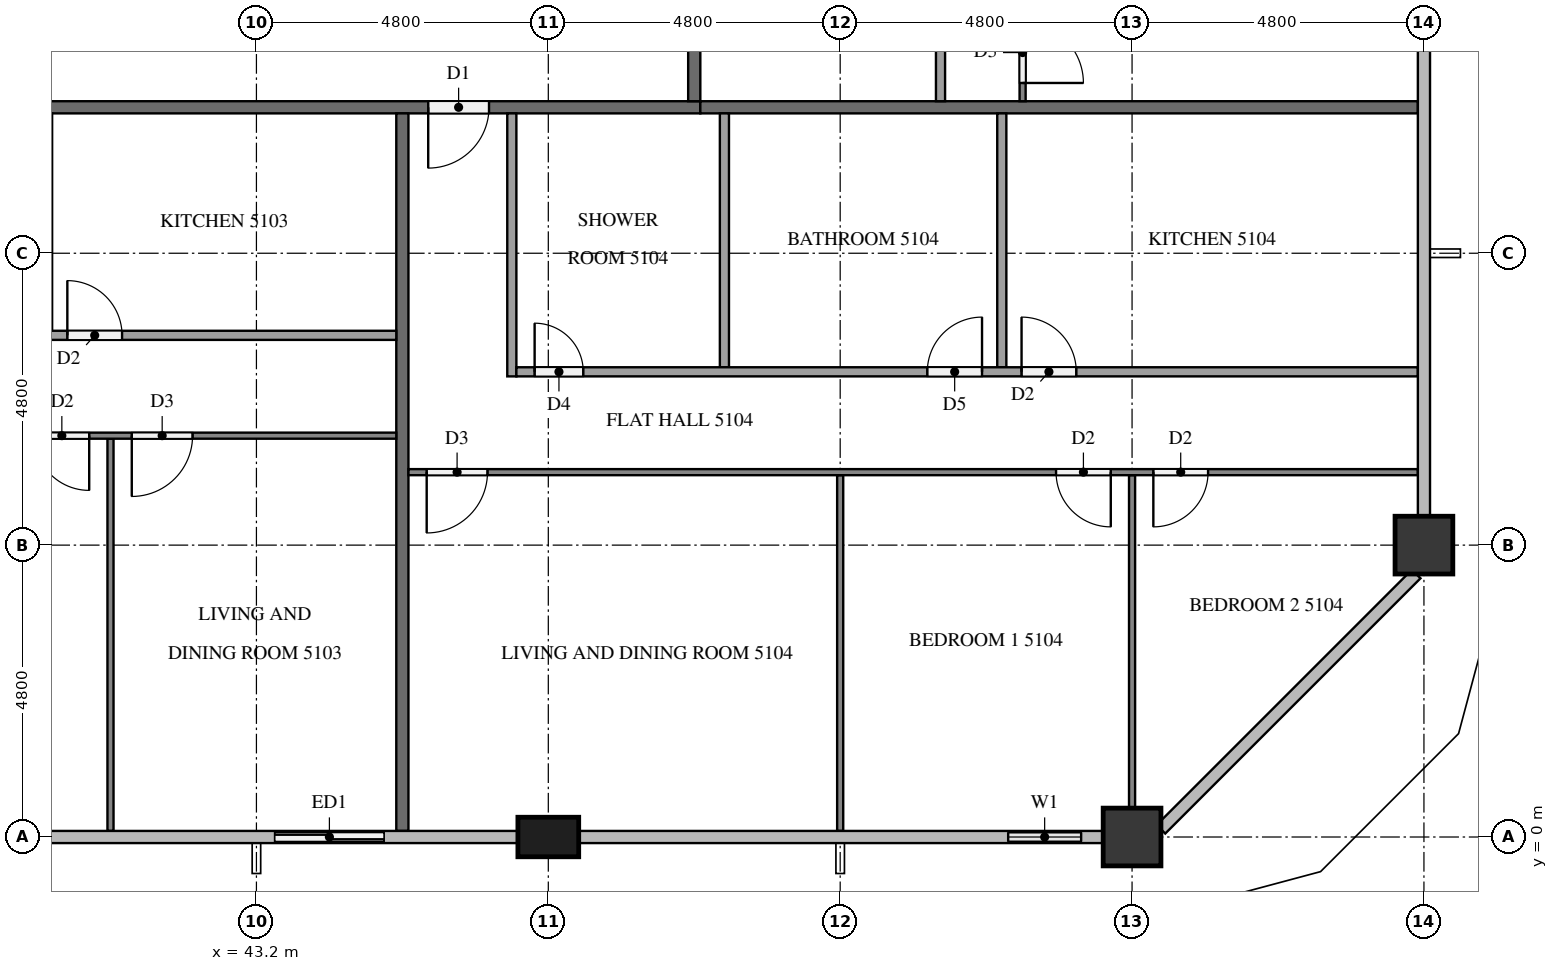
"""IFC4 building model, lengths in metres.
Left out: names, types, materials, properties, quantities, classifications, styles, units other than length and angle.
Written with IfcOpenShell. Run it as: python <this file> out.ifc"""

import sys

from ifc_helpers import new_model, si_unit, direction, frame, frame_2d, origin, origin_2d, place, context, subcontext, project, spatial, rectangle, extrude, element, fill, save


model = new_model("IFC4")
c1 = context("Model", 3, precision=1e-05, world=origin(), true_north=direction((0.0, 1.0)))
c2 = subcontext(c1, "Body", "Model", "MODEL_VIEW")
j1 = project(units=[si_unit("LENGTHUNIT", "METRE"), si_unit("PLANEANGLEUNIT", "RADIAN")], contexts=[c1])
p1 = place(None, origin())
s1 = spatial("IfcSite", under=j1, at=p1, CompositionType="ELEMENT")
p2 = place(p1, origin())
s2 = spatial("IfcBuilding", under=s1, at=p2, CompositionType="ELEMENT")
p3 = place(p2, frame((0.0, 0.0, 196.4)))
s3 = spatial("IfcBuildingStorey", under=s2, at=p3, CompositionType="ELEMENT", Elevation=196.4)
p4 = place(p3, frame((48.0, 0.0, 0.0), z_axis=(0.0, 0.0, 1.0), x_axis=(1.0, 0.0, 0.0)))
e1 = element("IfcColumn", 1, at=p4, inside=s3, PredefinedType="COLUMN", context=c2, shape_type="SweptSolid", body=[
    extrude(rectangle(XDim=1.0, YDim=0.65, at=origin_2d()), origin(), (0.0, 0.0, 1.0), 3.2),
])
for number, where, z_axis, x_axis in (
    (2, (57.6, 0.0, 0.0), (0.0, 0.0, 1.0), (1.0, 0.0, 0.0)),
    (3, (62.4, 4.8, 0.0), (0.0, 0.0, 1.0), (1.0, 0.0, 0.0)),
):
    element("IfcColumn", number, at=place(p3, frame(where, z_axis=z_axis, x_axis=x_axis)), inside=s3, PredefinedType="COLUMN", context=c2, shape_type="SweptSolid", body=[
        extrude(rectangle(XDim=0.95, YDim=0.95, at=origin_2d()), origin(), (0.0, 0.0, 1.0), 3.2),
    ])
p5 = place(p3, frame((43.2, 0.0, 0.0), z_axis=(0.0, 0.0, 1.0), x_axis=(1.0, 0.0, 0.0)))
e4 = element("IfcWall", 4, at=p5, inside=s3, PredefinedType="SOLIDWALL", context=c2, shape_type="SweptSolid", body=[
    extrude(rectangle(XDim=2.4, YDim=0.15, at=frame_2d((1.2, 0.0))), origin(), (0.0, 0.0, 1.0), 3.2),
])
p6 = place(p5, frame((0.3, 0.0, 0.0)))
e5 = element("IfcOpeningElement", 5, at=p6, cuts=e4, PredefinedType="OPENING", context=c2, shape_type="SweptSolid", body=[
    extrude(rectangle(XDim=1.8, YDim=2.4, at=frame_2d((0.9, 1.2))), frame((0.0, 0.085, 0.0), z_axis=(0.0, -1.0, 0.0), x_axis=(1.0, 0.0, 0.0)), (0.0, 0.0, 1.0), 0.17),
])
p7 = place(p3, frame((55.2, 0.0, 0.0), z_axis=(0.0, 0.0, 1.0), x_axis=(1.0, 0.0, 0.0)))
e6 = element("IfcWall", 6, at=p7, inside=s3, PredefinedType="SOLIDWALL", context=c2, shape_type="SweptSolid", body=[
    extrude(rectangle(XDim=1.925, YDim=0.15, at=frame_2d((0.962, 0.0))), origin(), (0.0, 0.0, 1.0), 3.2),
])
p8 = place(p7, frame((0.363, 0.0, 0.9)))
e7 = element("IfcOpeningElement", 7, at=p8, cuts=e6, PredefinedType="OPENING", context=c2, shape_type="SweptSolid", body=[
    extrude(rectangle(XDim=1.2, YDim=1.4, at=frame_2d((0.6, 0.7))), frame((0.0, 0.085, 0.0), z_axis=(0.0, -1.0, 0.0), x_axis=(1.0, 0.0, 0.0)), (0.0, 0.0, 1.0), 0.17),
])
p9 = place(p3, frame((50.5, 12.0, 0.0), z_axis=(0.0, 0.0, 1.0), x_axis=(-1.0, 0.0, 0.0)))
e8 = element("IfcWall", 8, at=p9, inside=s3, PredefinedType="PARTITIONING", context=c2, shape_type="SweptSolid", body=[
    extrude(rectangle(XDim=38.6, YDim=0.2, at=frame_2d((19.3, 0.0))), origin(), (0.0, 0.0, 1.0), 3.2),
])
p10 = place(p9, frame((31.725, 0.0, 0.0)))
e9 = element("IfcOpeningElement", 9, at=p10, cuts=e8, PredefinedType="OPENING", context=c2, shape_type="SweptSolid", body=[
    extrude(rectangle(XDim=1.0, YDim=2.1, at=frame_2d((0.5, 1.05))), frame((0.0, 0.11, 0.0), z_axis=(0.0, -1.0, 0.0), x_axis=(1.0, 0.0, 0.0)), (0.0, 0.0, 1.0), 0.22),
])
p11 = place(p9, frame((19.725, 0.0, 0.0)))
e10 = element("IfcOpeningElement", 10, at=p11, cuts=e8, PredefinedType="OPENING", context=c2, shape_type="SweptSolid", body=[
    extrude(rectangle(XDim=1.0, YDim=2.1, at=frame_2d((0.5, 1.05))), frame((0.0, 0.11, 0.0), z_axis=(0.0, -1.0, 0.0), x_axis=(1.0, 0.0, 0.0)), (0.0, 0.0, 1.0), 0.22),
])
p12 = place(p9, frame((17.875, 0.0, 0.0)))
e11 = element("IfcOpeningElement", 11, at=p12, cuts=e8, PredefinedType="OPENING", context=c2, shape_type="SweptSolid", body=[
    extrude(rectangle(XDim=1.0, YDim=2.1, at=frame_2d((0.5, 1.05))), frame((0.0, 0.11, 0.0), z_axis=(0.0, -1.0, 0.0), x_axis=(1.0, 0.0, 0.0)), (0.0, 0.0, 1.0), 0.22),
])
p13 = place(p9, frame((3.475, 0.0, 0.0)))
e12 = element("IfcOpeningElement", 12, at=p13, cuts=e8, PredefinedType="OPENING", context=c2, shape_type="SweptSolid", body=[
    extrude(rectangle(XDim=1.0, YDim=2.1, at=frame_2d((0.5, 1.05))), frame((0.0, 0.11, 0.0), z_axis=(0.0, -1.0, 0.0), x_axis=(1.0, 0.0, 0.0)), (0.0, 0.0, 1.0), 0.22),
])
p14 = place(p3, frame((50.4, 40.7, 0.0), z_axis=(0.0, 0.0, 1.0), x_axis=(0.0, -1.0, 0.0)))
e13 = element("IfcWall", 13, at=p14, inside=s3, PredefinedType="PARTITIONING", context=c2, shape_type="SweptSolid", body=[
    extrude(rectangle(XDim=28.6, YDim=0.2, at=frame_2d((14.3, 0.0))), origin(), (0.0, 0.0, 1.0), 3.2),
])
p15 = place(p14, frame((21.925, 0.0, 0.0)))
e14 = element("IfcOpeningElement", 14, at=p15, cuts=e13, PredefinedType="OPENING", context=c2, shape_type="SweptSolid", body=[
    extrude(rectangle(XDim=1.0, YDim=2.1, at=frame_2d((0.5, 1.05))), frame((0.0, 0.11, 0.0), z_axis=(0.0, -1.0, 0.0), x_axis=(1.0, 0.0, 0.0)), (0.0, 0.0, 1.0), 0.22),
])
p16 = place(p14, frame((20.075, 0.0, 0.0)))
e15 = element("IfcOpeningElement", 15, at=p16, cuts=e13, PredefinedType="OPENING", context=c2, shape_type="SweptSolid", body=[
    extrude(rectangle(XDim=1.0, YDim=2.1, at=frame_2d((0.5, 1.05))), frame((0.0, 0.11, 0.0), z_axis=(0.0, -1.0, 0.0), x_axis=(1.0, 0.0, 0.0)), (0.0, 0.0, 1.0), 0.22),
])
p17 = place(p14, frame((0.325, 0.0, 0.0)))
e16 = element("IfcOpeningElement", 16, at=p17, cuts=e13, PredefinedType="OPENING", context=c2, shape_type="SweptSolid", body=[
    extrude(rectangle(XDim=1.0, YDim=2.1, at=frame_2d((0.5, 1.05))), frame((0.0, 0.11, 0.0), z_axis=(0.0, -1.0, 0.0), x_axis=(1.0, 0.0, 0.0)), (0.0, 0.0, 1.0), 0.22),
])
p18 = place(p3, frame((45.6, 11.9, 0.0), z_axis=(0.0, 0.0, 1.0), x_axis=(0.0, -1.0, 0.0)))
e17 = element("IfcWall", 17, at=p18, inside=s3, PredefinedType="PARTITIONING", context=c2, shape_type="SweptSolid", body=[
    extrude(rectangle(XDim=11.8, YDim=0.2, at=frame_2d((5.9, 0.0))), origin(), (0.0, 0.0, 1.0), 3.2),
])
p19 = place(p3, frame((50.5, 12.0, 0.0), z_axis=(0.0, 0.0, 1.0), x_axis=(1.0, 0.0, 0.0)))
e18 = element("IfcWall", 18, at=p19, inside=s3, PredefinedType="PARTITIONING", context=c2, shape_type="SweptSolid", body=[
    extrude(rectangle(XDim=11.8, YDim=0.2, at=frame_2d((5.9, 0.0))), origin(), (0.0, 0.0, 1.0), 3.2),
])
p20 = place(p3, frame((40.8, 6.55, 0.0), z_axis=(0.0, 0.0, 1.0), x_axis=(0.0, -1.0, 0.0)))
e19 = element("IfcWall", 19, at=p20, inside=s3, PredefinedType="PARTITIONING", context=c2, shape_type="SweptSolid", body=[
    extrude(rectangle(XDim=6.45, YDim=0.1, at=frame_2d((3.225, 0.0))), origin(), (0.0, 0.0, 1.0), 3.2),
])
p21 = place(p3, frame((45.5, 6.6, 0.0), z_axis=(0.0, 0.0, 1.0), x_axis=(-1.0, 0.0, 0.0)))
e20 = element("IfcWall", 20, at=p21, inside=s3, PredefinedType="PARTITIONING", context=c2, shape_type="SweptSolid", body=[
    extrude(rectangle(XDim=14.2, YDim=0.1, at=frame_2d((7.1, 0.0))), origin(), (0.0, 0.0, 1.0), 3.2),
])
p22 = place(p21, frame((13.0, 0.0, 0.0)))
e21 = element("IfcOpeningElement", 21, at=p22, cuts=e20, PredefinedType="OPENING", context=c2, shape_type="SweptSolid", body=[
    extrude(rectangle(XDim=0.9, YDim=2.1, at=frame_2d((0.45, 1.05))), frame((0.0, 0.06, 0.0), z_axis=(0.0, -1.0, 0.0), x_axis=(1.0, 0.0, 0.0)), (0.0, 0.0, 1.0), 0.12),
])
p23 = place(p21, frame((5.05, 0.0, 0.0)))
e22 = element("IfcOpeningElement", 22, at=p23, cuts=e20, PredefinedType="OPENING", context=c2, shape_type="SweptSolid", body=[
    extrude(rectangle(XDim=0.9, YDim=2.1, at=frame_2d((0.45, 1.05))), frame((0.0, 0.06, 0.0), z_axis=(0.0, -1.0, 0.0), x_axis=(1.0, 0.0, 0.0)), (0.0, 0.0, 1.0), 0.12),
])
p24 = place(p21, frame((3.35, 0.0, 0.0)))
e23 = element("IfcOpeningElement", 23, at=p24, cuts=e20, PredefinedType="OPENING", context=c2, shape_type="SweptSolid", body=[
    extrude(rectangle(XDim=1.0, YDim=2.1, at=frame_2d((0.5, 1.05))), frame((0.0, 0.06, 0.0), z_axis=(0.0, -1.0, 0.0), x_axis=(1.0, 0.0, 0.0)), (0.0, 0.0, 1.0), 0.12),
])
p25 = place(p3, frame((33.075, 8.25, 0.0), z_axis=(0.0, 0.0, 1.0), x_axis=(1.0, 0.0, 0.0)))
e24 = element("IfcWall", 24, at=p25, inside=s3, PredefinedType="PARTITIONING", context=c2, shape_type="SweptSolid", body=[
    extrude(rectangle(XDim=12.425, YDim=0.15, at=frame_2d((6.212, 0.0))), origin(), (0.0, 0.0, 1.0), 3.2),
])
p26 = place(p25, frame((0.3, 0.0, 0.0)))
e25 = element("IfcOpeningElement", 25, at=p26, cuts=e24, PredefinedType="OPENING", context=c2, shape_type="SweptSolid", body=[
    extrude(rectangle(XDim=0.9, YDim=2.1, at=frame_2d((0.45, 1.05))), frame((0.0, 0.085, 0.0), z_axis=(0.0, -1.0, 0.0), x_axis=(1.0, 0.0, 0.0)), (0.0, 0.0, 1.0), 0.17),
])
p27 = place(p25, frame((5.565, 0.0, 0.0)))
e26 = element("IfcOpeningElement", 26, at=p27, cuts=e24, PredefinedType="OPENING", context=c2, shape_type="SweptSolid", body=[
    extrude(rectangle(XDim=0.8, YDim=2.1, at=frame_2d((0.4, 1.05))), frame((0.0, 0.085, 0.0), z_axis=(0.0, -1.0, 0.0), x_axis=(1.0, 0.0, 0.0)), (0.0, 0.0, 1.0), 0.17),
])
p28 = place(p25, frame((7.015, 0.0, 0.0)))
e27 = element("IfcOpeningElement", 27, at=p28, cuts=e24, PredefinedType="OPENING", context=c2, shape_type="SweptSolid", body=[
    extrude(rectangle(XDim=0.9, YDim=2.1, at=frame_2d((0.45, 1.05))), frame((0.0, 0.085, 0.0), z_axis=(0.0, -1.0, 0.0), x_axis=(1.0, 0.0, 0.0)), (0.0, 0.0, 1.0), 0.17),
])
p29 = place(p3, frame((52.8, 5.95, 0.0), z_axis=(0.0, 0.0, 1.0), x_axis=(0.0, -1.0, 0.0)))
e28 = element("IfcWall", 28, at=p29, inside=s3, PredefinedType="PARTITIONING", context=c2, shape_type="SweptSolid", body=[
    extrude(rectangle(XDim=5.85, YDim=0.1, at=frame_2d((2.925, 0.0))), origin(), (0.0, 0.0, 1.0), 3.2),
])
p30 = place(p3, frame((57.6, 5.95, 0.0), z_axis=(0.0, 0.0, 1.0), x_axis=(0.0, -1.0, 0.0)))
e29 = element("IfcWall", 29, at=p30, inside=s3, PredefinedType="PARTITIONING", context=c2, shape_type="SweptSolid", body=[
    extrude(rectangle(XDim=5.475, YDim=0.1, at=frame_2d((2.737, 0.0))), origin(), (0.0, 0.0, 1.0), 3.2),
])
p31 = place(p3, frame((62.3, 6.0, 0.0), z_axis=(0.0, 0.0, 1.0), x_axis=(-1.0, 0.0, 0.0)))
e30 = element("IfcWall", 30, at=p31, inside=s3, PredefinedType="PARTITIONING", context=c2, shape_type="SweptSolid", body=[
    extrude(rectangle(XDim=16.6, YDim=0.1, at=frame_2d((8.3, 0.0))), origin(), (0.0, 0.0, 1.0), 3.2),
])
p32 = place(p31, frame((15.3, 0.0, 0.0)))
e31 = element("IfcOpeningElement", 31, at=p32, cuts=e30, PredefinedType="OPENING", context=c2, shape_type="SweptSolid", body=[
    extrude(rectangle(XDim=1.0, YDim=2.1, at=frame_2d((0.5, 1.05))), frame((0.0, 0.06, 0.0), z_axis=(0.0, -1.0, 0.0), x_axis=(1.0, 0.0, 0.0)), (0.0, 0.0, 1.0), 0.12),
])
p33 = place(p31, frame((5.05, 0.0, 0.0)))
e32 = element("IfcOpeningElement", 32, at=p33, cuts=e30, PredefinedType="OPENING", context=c2, shape_type="SweptSolid", body=[
    extrude(rectangle(XDim=0.9, YDim=2.1, at=frame_2d((0.45, 1.05))), frame((0.0, 0.06, 0.0), z_axis=(0.0, -1.0, 0.0), x_axis=(1.0, 0.0, 0.0)), (0.0, 0.0, 1.0), 0.12),
])
p34 = place(p31, frame((3.45, 0.0, 0.0)))
e33 = element("IfcOpeningElement", 33, at=p34, cuts=e30, PredefinedType="OPENING", context=c2, shape_type="SweptSolid", body=[
    extrude(rectangle(XDim=0.9, YDim=2.1, at=frame_2d((0.45, 1.05))), frame((0.0, 0.06, 0.0), z_axis=(0.0, -1.0, 0.0), x_axis=(1.0, 0.0, 0.0)), (0.0, 0.0, 1.0), 0.12),
])
for number, where, z_axis, x_axis in (
    (34, (50.896, 11.9, 0.0), (0.0, 0.0, 1.0), (0.0, -1.0, 0.0)),
    (35, (55.458, 11.9, 0.0), (0.0, 0.0, 1.0), (0.0, -1.0, 0.0)),
):
    element("IfcWall", number, at=place(p3, frame(where, z_axis=z_axis, x_axis=x_axis)), inside=s3, PredefinedType="PARTITIONING", context=c2, shape_type="SweptSolid", body=[
        extrude(rectangle(XDim=4.175, YDim=0.15, at=frame_2d((2.087, 0.0))), origin(), (0.0, 0.0, 1.0), 3.2),
    ])
p35 = place(p3, frame((47.4, 11.9, 0.0), z_axis=(0.0, 0.0, 1.0), x_axis=(0.0, -1.0, 0.0)))
e36 = element("IfcWall", 36, at=p35, inside=s3, PredefinedType="PARTITIONING", context=c2, shape_type="SweptSolid", body=[
    extrude(rectangle(XDim=4.325, YDim=0.15, at=frame_2d((2.163, 0.0))), origin(), (0.0, 0.0, 1.0), 3.2),
])
p36 = place(p3, frame((47.475, 7.65, 0.0), z_axis=(0.0, 0.0, 1.0), x_axis=(1.0, 0.0, 0.0)))
e37 = element("IfcWall", 37, at=p36, inside=s3, PredefinedType="PARTITIONING", context=c2, shape_type="SweptSolid", body=[
    extrude(rectangle(XDim=14.825, YDim=0.15, at=frame_2d((7.413, 0.0))), origin(), (0.0, 0.0, 1.0), 3.2),
])
p37 = place(p36, frame((0.3, 0.0, 0.0)))
e38 = element("IfcOpeningElement", 38, at=p37, cuts=e37, PredefinedType="OPENING", context=c2, shape_type="SweptSolid", body=[
    extrude(rectangle(XDim=0.8, YDim=2.1, at=frame_2d((0.4, 1.05))), frame((0.0, 0.085, 0.0), z_axis=(0.0, -1.0, 0.0), x_axis=(1.0, 0.0, 0.0)), (0.0, 0.0, 1.0), 0.17),
])
p38 = place(p36, frame((6.758, 0.0, 0.0)))
e39 = element("IfcOpeningElement", 39, at=p38, cuts=e37, PredefinedType="OPENING", context=c2, shape_type="SweptSolid", body=[
    extrude(rectangle(XDim=0.9, YDim=2.1, at=frame_2d((0.45, 1.05))), frame((0.0, 0.085, 0.0), z_axis=(0.0, -1.0, 0.0), x_axis=(1.0, 0.0, 0.0)), (0.0, 0.0, 1.0), 0.17),
])
p39 = place(p36, frame((8.308, 0.0, 0.0)))
e40 = element("IfcOpeningElement", 40, at=p39, cuts=e37, PredefinedType="OPENING", context=c2, shape_type="SweptSolid", body=[
    extrude(rectangle(XDim=0.9, YDim=2.1, at=frame_2d((0.45, 1.05))), frame((0.0, 0.085, 0.0), z_axis=(0.0, -1.0, 0.0), x_axis=(1.0, 0.0, 0.0)), (0.0, 0.0, 1.0), 0.17),
])
p40 = place(p3, frame((55.8, 19.1, 0.0), z_axis=(0.0, 0.0, 1.0), x_axis=(0.0, -1.0, 0.0)))
e41 = element("IfcWall", 41, at=p40, inside=s3, PredefinedType="PARTITIONING", context=c2, shape_type="SweptSolid", body=[
    extrude(rectangle(XDim=7.0, YDim=0.1, at=frame_2d((3.5, 0.0))), origin(), (0.0, 0.0, 1.0), 3.2),
])
p41 = place(p40, frame((5.7, 0.0, 0.0)))
e42 = element("IfcOpeningElement", 42, at=p41, cuts=e41, PredefinedType="OPENING", context=c2, shape_type="SweptSolid", body=[
    extrude(rectangle(XDim=1.0, YDim=2.1, at=frame_2d((0.5, 1.05))), frame((0.0, 0.06, 0.0), z_axis=(0.0, -1.0, 0.0), x_axis=(1.0, 0.0, 0.0)), (0.0, 0.0, 1.0), 0.12),
])
p42 = place(p3, frame((54.45, 12.1, 0.0), z_axis=(0.0, 0.0, 1.0), x_axis=(0.0, 1.0, 0.0)))
e43 = element("IfcWall", 43, at=p42, inside=s3, PredefinedType="PARTITIONING", context=c2, shape_type="SweptSolid", body=[
    extrude(rectangle(XDim=5.225, YDim=0.15, at=frame_2d((2.612, 0.0))), origin(), (0.0, 0.0, 1.0), 3.2),
])
p43 = place(p42, frame((3.46, 0.0, 0.0)))
e44 = element("IfcOpeningElement", 44, at=p43, cuts=e43, PredefinedType="OPENING", context=c2, shape_type="SweptSolid", body=[
    extrude(rectangle(XDim=0.8, YDim=2.1, at=frame_2d((0.4, 1.05))), frame((0.0, 0.085, 0.0), z_axis=(0.0, -1.0, 0.0), x_axis=(1.0, 0.0, 0.0)), (0.0, 0.0, 1.0), 0.17),
])
p44 = place(p42, frame((1.91, 0.0, 0.0)))
e45 = element("IfcOpeningElement", 45, at=p44, cuts=e43, PredefinedType="OPENING", context=c2, shape_type="SweptSolid", body=[
    extrude(rectangle(XDim=0.9, YDim=2.1, at=frame_2d((0.45, 1.05))), frame((0.0, 0.085, 0.0), z_axis=(0.0, -1.0, 0.0), x_axis=(1.0, 0.0, 0.0)), (0.0, 0.0, 1.0), 0.17),
])
p45 = place(p6, origin())
e46 = element("IfcDoor", 46, at=p45, inside=s3, OperationType="SLIDING_TO_LEFT", PredefinedType="DOOR", context=c2, shape_type="SweptSolid", body=[
    extrude(rectangle(XDim=1.8, YDim=2.4, at=frame_2d((0.9, 1.2))), frame((0.0, 0.025, 0.0), z_axis=(0.0, -1.0, 0.0), x_axis=(1.0, 0.0, 0.0)), (0.0, 0.0, 1.0), 0.05),
])
fill(e5, e46)
p46 = place(p8, origin())
e47 = element("IfcWindow", 47, at=p46, inside=s3, PartitioningType="SINGLE_PANEL", PredefinedType="WINDOW", context=c2, shape_type="SweptSolid", body=[
    extrude(rectangle(XDim=1.2, YDim=1.4, at=frame_2d((0.6, 0.7))), frame((0.0, 0.03, 0.0), z_axis=(0.0, -1.0, 0.0), x_axis=(1.0, 0.0, 0.0)), (0.0, 0.0, 1.0), 0.06),
])
fill(e7, e47)
p47 = place(p13, origin())
e48 = element("IfcDoor", 48, at=p47, inside=s3, OperationType="SINGLE_SWING_RIGHT", PredefinedType="DOOR", context=c2, shape_type="SweptSolid", body=[
    extrude(rectangle(XDim=1.0, YDim=2.1, at=frame_2d((0.5, 1.05))), frame((0.0, 0.025, 0.0), z_axis=(0.0, -1.0, 0.0), x_axis=(1.0, 0.0, 0.0)), (0.0, 0.0, 1.0), 0.05),
])
fill(e12, e48)
p48 = place(p23, origin())
e49 = element("IfcDoor", 49, at=p48, inside=s3, OperationType="SINGLE_SWING_LEFT", PredefinedType="DOOR", context=c2, shape_type="SweptSolid", body=[
    extrude(rectangle(XDim=0.9, YDim=2.1, at=frame_2d((0.45, 1.05))), frame((0.0, 0.025, 0.0), z_axis=(0.0, -1.0, 0.0), x_axis=(1.0, 0.0, 0.0)), (0.0, 0.0, 1.0), 0.05),
])
fill(e22, e49)
p49 = place(p24, origin())
e50 = element("IfcDoor", 50, at=p49, inside=s3, OperationType="SINGLE_SWING_RIGHT", PredefinedType="DOOR", context=c2, shape_type="SweptSolid", body=[
    extrude(rectangle(XDim=1.0, YDim=2.1, at=frame_2d((0.5, 1.05))), frame((0.0, 0.025, 0.0), z_axis=(0.0, -1.0, 0.0), x_axis=(1.0, 0.0, 0.0)), (0.0, 0.0, 1.0), 0.05),
])
fill(e23, e50)
p50 = place(p28, origin())
e51 = element("IfcDoor", 51, at=p50, inside=s3, OperationType="SINGLE_SWING_LEFT", PredefinedType="DOOR", context=c2, shape_type="SweptSolid", body=[
    extrude(rectangle(XDim=0.9, YDim=2.1, at=frame_2d((0.45, 1.05))), frame((0.0, 0.025, 0.0), z_axis=(0.0, -1.0, 0.0), x_axis=(1.0, 0.0, 0.0)), (0.0, 0.0, 1.0), 0.05),
])
fill(e27, e51)
p51 = place(p32, origin())
e52 = element("IfcDoor", 52, at=p51, inside=s3, OperationType="SINGLE_SWING_RIGHT", PredefinedType="DOOR", context=c2, shape_type="SweptSolid", body=[
    extrude(rectangle(XDim=1.0, YDim=2.1, at=frame_2d((0.5, 1.05))), frame((0.0, 0.025, 0.0), z_axis=(0.0, -1.0, 0.0), x_axis=(1.0, 0.0, 0.0)), (0.0, 0.0, 1.0), 0.05),
])
fill(e31, e52)
p52 = place(p33, origin())
e53 = element("IfcDoor", 53, at=p52, inside=s3, OperationType="SINGLE_SWING_LEFT", PredefinedType="DOOR", context=c2, shape_type="SweptSolid", body=[
    extrude(rectangle(XDim=0.9, YDim=2.1, at=frame_2d((0.45, 1.05))), frame((0.0, 0.025, 0.0), z_axis=(0.0, -1.0, 0.0), x_axis=(1.0, 0.0, 0.0)), (0.0, 0.0, 1.0), 0.05),
])
fill(e32, e53)
p53 = place(p34, origin())
e54 = element("IfcDoor", 54, at=p53, inside=s3, OperationType="SINGLE_SWING_RIGHT", PredefinedType="DOOR", context=c2, shape_type="SweptSolid", body=[
    extrude(rectangle(XDim=0.9, YDim=2.1, at=frame_2d((0.45, 1.05))), frame((0.0, 0.025, 0.0), z_axis=(0.0, -1.0, 0.0), x_axis=(1.0, 0.0, 0.0)), (0.0, 0.0, 1.0), 0.05),
])
fill(e33, e54)
p54 = place(p37, origin())
e55 = element("IfcDoor", 55, at=p54, inside=s3, OperationType="SINGLE_SWING_LEFT", PredefinedType="DOOR", context=c2, shape_type="SweptSolid", body=[
    extrude(rectangle(XDim=0.8, YDim=2.1, at=frame_2d((0.4, 1.05))), frame((0.0, 0.025, 0.0), z_axis=(0.0, -1.0, 0.0), x_axis=(1.0, 0.0, 0.0)), (0.0, 0.0, 1.0), 0.05),
])
fill(e38, e55)
p55 = place(p38, origin())
e56 = element("IfcDoor", 56, at=p55, inside=s3, OperationType="SINGLE_SWING_RIGHT", PredefinedType="DOOR", context=c2, shape_type="SweptSolid", body=[
    extrude(rectangle(XDim=0.9, YDim=2.1, at=frame_2d((0.45, 1.05))), frame((0.0, 0.025, 0.0), z_axis=(0.0, -1.0, 0.0), x_axis=(1.0, 0.0, 0.0)), (0.0, 0.0, 1.0), 0.05),
])
fill(e39, e56)
p56 = place(p39, origin())
e57 = element("IfcDoor", 57, at=p56, inside=s3, OperationType="SINGLE_SWING_LEFT", PredefinedType="DOOR", context=c2, shape_type="SweptSolid", body=[
    extrude(rectangle(XDim=0.9, YDim=2.1, at=frame_2d((0.45, 1.05))), frame((0.0, 0.025, 0.0), z_axis=(0.0, -1.0, 0.0), x_axis=(1.0, 0.0, 0.0)), (0.0, 0.0, 1.0), 0.05),
])
fill(e40, e57)
p57 = place(p41, origin())
e58 = element("IfcDoor", 58, at=p57, inside=s3, OperationType="SINGLE_SWING_RIGHT", PredefinedType="DOOR", context=c2, shape_type="SweptSolid", body=[
    extrude(rectangle(XDim=1.0, YDim=2.1, at=frame_2d((0.5, 1.05))), frame((0.0, 0.025, 0.0), z_axis=(0.0, -1.0, 0.0), x_axis=(1.0, 0.0, 0.0)), (0.0, 0.0, 1.0), 0.05),
])
fill(e42, e58)
save(model, sys.argv[1])
